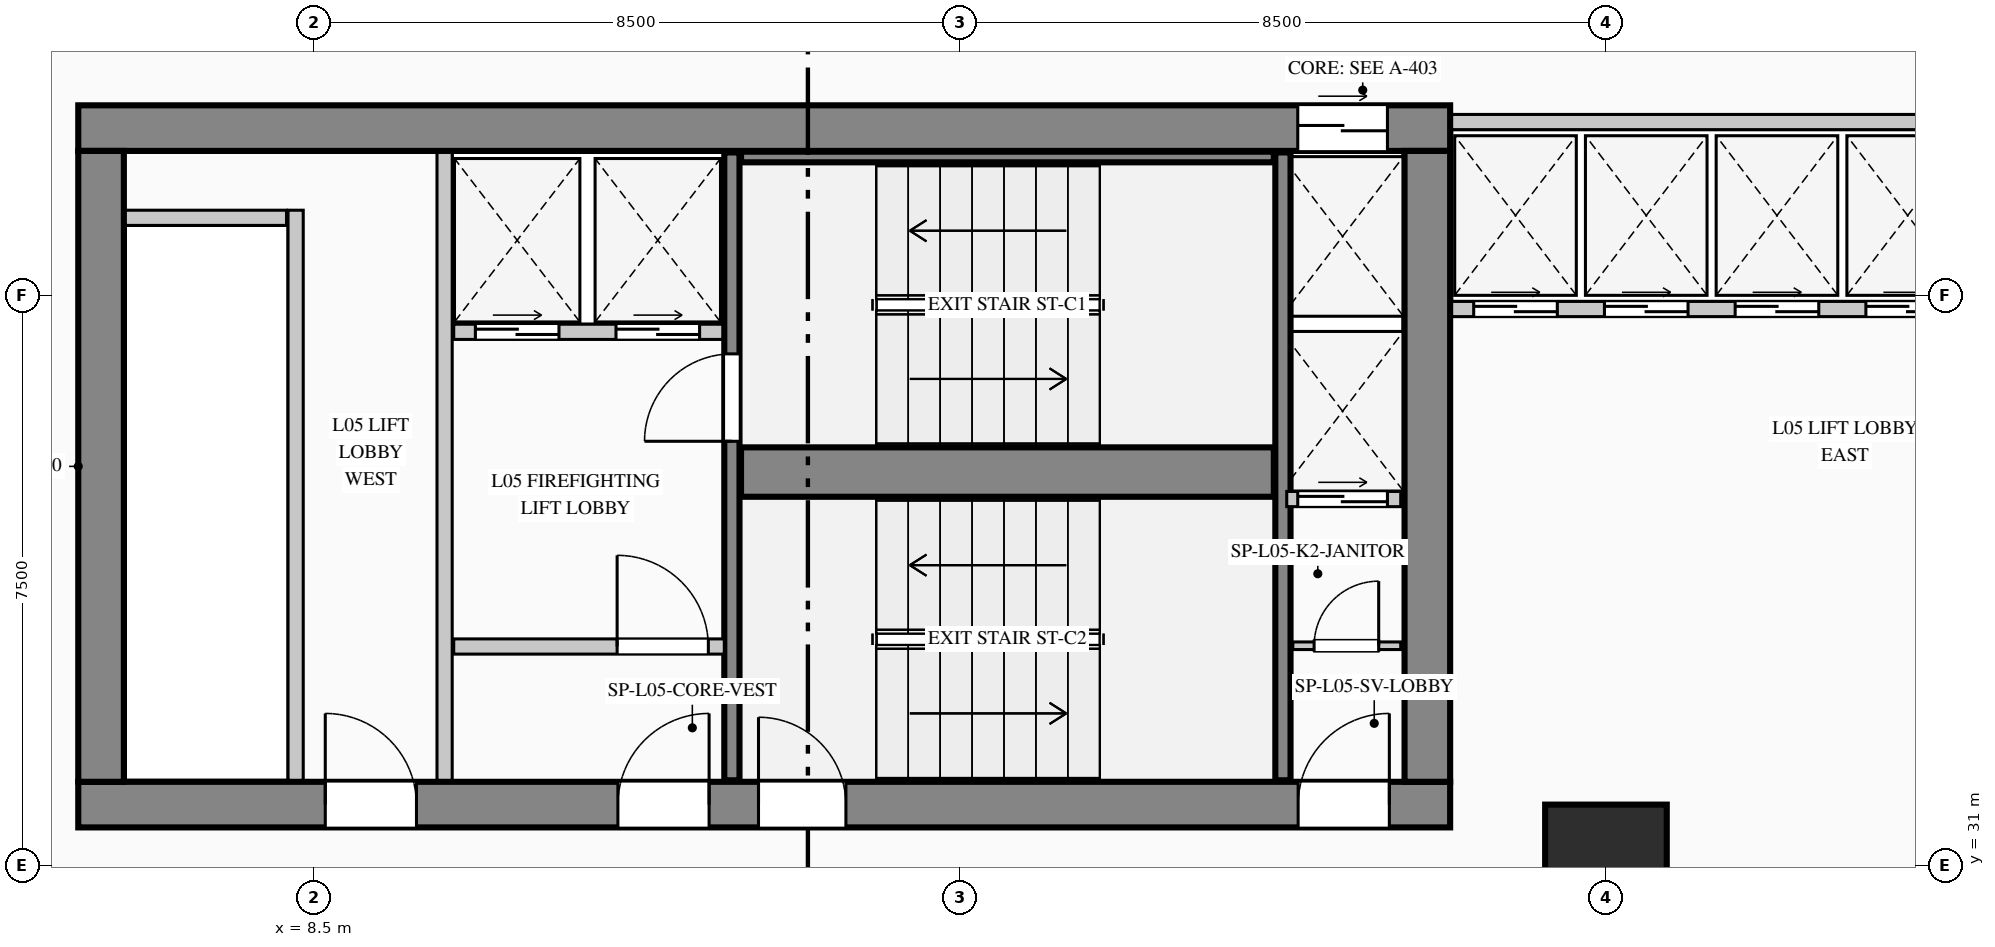
"""IFC4 building model, lengths in metres.
Left out: names, types, materials, properties, quantities, classifications, styles, units other than length and angle.
Written with IfcOpenShell. Run it as: python <this file> out.ifc"""

import sys

from ifc_helpers import new_model, si_unit, direction, frame, frame_2d, origin, origin_2d, place, context, subcontext, project, spatial, rectangle, extrude, element, fill, save


model = new_model("IFC4")
c1 = context("Model", 3, precision=1e-05, world=origin(), true_north=direction((0.0, 1.0)))
c2 = subcontext(c1, "Body", "Model", "MODEL_VIEW")
j1 = project(units=[si_unit("LENGTHUNIT", "METRE"), si_unit("PLANEANGLEUNIT", "RADIAN")], contexts=[c1])
p1 = place(None, origin())
s1 = spatial("IfcSite", under=j1, at=p1, CompositionType="ELEMENT")
p2 = place(p1, origin())
s2 = spatial("IfcBuilding", under=s1, at=p2, CompositionType="ELEMENT")
p3 = place(p2, frame((0.0, 0.0, 21.6)))
s3 = spatial("IfcBuildingStorey", under=s2, at=p3, CompositionType="ELEMENT", Elevation=21.6)
p4 = place(p3, frame((5.4, 40.7, 0.0), z_axis=(0.0, 0.0, 1.0), x_axis=(1.0, 0.0, 0.0)))
e1 = element("IfcWall", 1, at=p4, inside=s3, PredefinedType="SHEAR", context=c2, shape_type="SweptSolid", body=[
    extrude(rectangle(XDim=18.05, YDim=0.6, at=frame_2d((9.025, 0.0))), origin(), (0.0, 0.0, 1.0), 5.4),
])
p5 = place(p4, frame((16.045, 0.0, 0.0)))
e2 = element("IfcOpeningElement", 2, at=p5, cuts=e1, PredefinedType="OPENING", context=c2, shape_type="SweptSolid", body=[
    extrude(rectangle(XDim=1.18, YDim=2.25, at=frame_2d((0.59, 1.125))), frame((0.0, 0.31, 0.0), z_axis=(0.0, -1.0, 0.0), x_axis=(1.0, 0.0, 0.0)), (0.0, 0.0, 1.0), 0.62),
])
p6 = place(p3, frame((5.4, 31.8, 0.0), z_axis=(0.0, 0.0, 1.0), x_axis=(1.0, 0.0, 0.0)))
e3 = element("IfcWall", 3, at=p6, inside=s3, PredefinedType="SHEAR", context=c2, shape_type="SweptSolid", body=[
    extrude(rectangle(XDim=18.05, YDim=0.6, at=frame_2d((9.025, 0.0))), origin(), (0.0, 0.0, 1.0), 5.4),
])
p7 = place(p6, frame((3.25, 0.0, 0.0)))
e4 = element("IfcOpeningElement", 4, at=p7, cuts=e3, PredefinedType="OPENING", context=c2, shape_type="SweptSolid", body=[
    extrude(rectangle(XDim=1.2, YDim=2.2, at=frame_2d((0.6, 1.1))), frame((0.0, 0.31, 0.0), z_axis=(0.0, -1.0, 0.0), x_axis=(1.0, 0.0, 0.0)), (0.0, 0.0, 1.0), 0.62),
])
p8 = place(p6, frame((7.1, 0.0, 0.0)))
e5 = element("IfcOpeningElement", 5, at=p8, cuts=e3, PredefinedType="OPENING", context=c2, shape_type="SweptSolid", body=[
    extrude(rectangle(XDim=1.2, YDim=2.2, at=frame_2d((0.6, 1.1))), frame((0.0, 0.31, 0.0), z_axis=(0.0, -1.0, 0.0), x_axis=(1.0, 0.0, 0.0)), (0.0, 0.0, 1.0), 0.62),
])
p9 = place(p6, frame((8.95, 0.0, 0.0)))
e6 = element("IfcOpeningElement", 6, at=p9, cuts=e3, PredefinedType="OPENING", context=c2, shape_type="SweptSolid", body=[
    extrude(rectangle(XDim=1.15, YDim=2.2, at=frame_2d((0.575, 1.1))), frame((0.0, 0.31, 0.0), z_axis=(0.0, -1.0, 0.0), x_axis=(1.0, 0.0, 0.0)), (0.0, 0.0, 1.0), 0.62),
])
p10 = place(p6, frame((16.05, 0.0, 0.0)))
e7 = element("IfcOpeningElement", 7, at=p10, cuts=e3, PredefinedType="OPENING", context=c2, shape_type="SweptSolid", body=[
    extrude(rectangle(XDim=1.2, YDim=2.2, at=frame_2d((0.6, 1.1))), frame((0.0, 0.31, 0.0), z_axis=(0.0, -1.0, 0.0), x_axis=(1.0, 0.0, 0.0)), (0.0, 0.0, 1.0), 0.62),
])
for number, where, z_axis, x_axis in (
    (8, (5.7, 32.1, 0.0), (0.0, 0.0, 1.0), (0.0, 1.0, 0.0)),
    (9, (23.15, 32.1, 0.0), (0.0, 0.0, 1.0), (0.0, 1.0, 0.0)),
):
    element("IfcWall", number, at=place(p3, frame(where, z_axis=z_axis, x_axis=x_axis)), inside=s3, PredefinedType="SHEAR", context=c2, shape_type="SweptSolid", body=[
        extrude(rectangle(XDim=8.3, YDim=0.6, at=frame_2d((4.15, 0.0))), origin(), (0.0, 0.0, 1.0), 5.4),
    ])
p11 = place(p3, frame((14.0, 32.12, 0.0), z_axis=(0.0, 0.0, 1.0), x_axis=(0.0, 1.0, 0.0)))
e10 = element("IfcWall", 10, at=p11, inside=s3, PredefinedType="SHEAR", context=c2, shape_type="SweptSolid", body=[
    extrude(rectangle(XDim=8.26, YDim=0.2, at=frame_2d((4.13, 0.0))), origin(), (0.0, 0.0, 1.0), 5.4),
])
p12 = place(p11, frame((4.46, 0.0, 0.0)))
e11 = element("IfcOpeningElement", 11, at=p12, cuts=e10, PredefinedType="OPENING", context=c2, shape_type="SweptSolid", body=[
    extrude(rectangle(XDim=1.15, YDim=2.2, at=frame_2d((0.575, 1.1))), frame((0.0, 0.11, 0.0), z_axis=(0.0, -1.0, 0.0), x_axis=(1.0, 0.0, 0.0)), (0.0, 0.0, 1.0), 0.22),
])
p13 = place(p3, frame((14.12, 36.175, 0.0), z_axis=(0.0, 0.0, 1.0), x_axis=(1.0, 0.0, 0.0)))
e12 = element("IfcWall", 12, at=p13, inside=s3, PredefinedType="SHEAR", context=c2, shape_type="SweptSolid", body=[
    extrude(rectangle(XDim=7.01, YDim=0.65, at=frame_2d((3.505, 0.0))), origin(), (0.0, 0.0, 1.0), 5.4),
])
p14 = place(p3, frame((21.25, 32.12, 0.0), z_axis=(0.0, 0.0, 1.0), x_axis=(0.0, 1.0, 0.0)))
e13 = element("IfcWall", 13, at=p14, inside=s3, PredefinedType="SHEAR", context=c2, shape_type="SweptSolid", body=[
    extrude(rectangle(XDim=8.26, YDim=0.2, at=frame_2d((4.13, 0.0))), origin(), (0.0, 0.0, 1.0), 5.4),
])
p15 = place(p3, frame((14.12, 40.32, 0.0), z_axis=(0.0, 0.0, 1.0), x_axis=(1.0, 0.0, 0.0)))
e14 = element("IfcWall", 14, at=p15, inside=s3, PredefinedType="SHEAR", context=c2, shape_type="SweptSolid", body=[
    extrude(rectangle(XDim=7.01, YDim=0.14, at=frame_2d((3.505, 0.0))), origin(), (0.0, 0.0, 1.0), 5.4),
])
p16 = place(p3, frame((25.5, 31.0, 0.0), z_axis=(0.0, 0.0, 1.0), x_axis=(1.0, 0.0, 0.0)))
e15 = element("IfcColumn", 15, at=p16, inside=s3, PredefinedType="COLUMN", context=c2, shape_type="SweptSolid", body=[
    extrude(rectangle(XDim=1.6, YDim=1.6, at=origin_2d()), origin(), (0.0, 0.0, 1.0), 5.4),
])
p17 = place(p3, frame((8.531, 4.85, 0.0), z_axis=(0.0, 0.0, 1.0), x_axis=(-0.150391137476, 0.988626575492, 0.0)))
e16 = element("IfcWall", 16, at=p17, inside=s3, PredefinedType="STANDARD", context=c2, shape_type="SweptSolid", body=[
    extrude(rectangle(XDim=36.718, YDim=0.3, at=frame_2d((18.359, 0.0))), origin(), (0.0, 0.0, 1.0), 5.0),
])
p18 = place(p3, frame((8.26, 32.12, 0.0), z_axis=(0.0, 0.0, 1.0), x_axis=(0.0, 1.0, 0.0)))
e17 = element("IfcWall", 17, at=p18, inside=s3, PredefinedType="PARTITIONING", context=c2, shape_type="SweptSolid", body=[
    extrude(rectangle(XDim=7.5, YDim=0.2, at=frame_2d((3.75, 0.0))), origin(), (0.0, 0.0, 1.0), 5.0),
])
p19 = place(p3, frame((6.02, 39.52, 0.0), z_axis=(0.0, 0.0, 1.0), x_axis=(1.0, 0.0, 0.0)))
e18 = element("IfcWall", 18, at=p19, inside=s3, PredefinedType="PARTITIONING", context=c2, shape_type="SweptSolid", body=[
    extrude(rectangle(XDim=2.12, YDim=0.2, at=frame_2d((1.06, 0.0))), origin(), (0.0, 0.0, 1.0), 5.0),
])
p20 = place(p3, frame((10.22, 32.12, 0.0), z_axis=(0.0, 0.0, 1.0), x_axis=(0.0, 1.0, 0.0)))
e19 = element("IfcWall", 19, at=p20, inside=s3, PredefinedType="PARTITIONING", context=c2, shape_type="SweptSolid", body=[
    extrude(rectangle(XDim=8.26, YDim=0.2, at=frame_2d((4.13, 0.0))), origin(), (0.0, 0.0, 1.0), 5.0),
])
p21 = place(p3, frame((10.34, 38.02, 0.0), z_axis=(0.0, 0.0, 1.0), x_axis=(1.0, 0.0, 0.0)))
e20 = element("IfcWall", 20, at=p21, inside=s3, PredefinedType="PARTITIONING", context=c2, shape_type="SweptSolid", body=[
    extrude(rectangle(XDim=3.54, YDim=0.2, at=frame_2d((1.77, 0.0))), origin(), (0.0, 0.0, 1.0), 5.0),
])
p22 = place(p21, frame((0.285, 0.0, 0.0)))
e21 = element("IfcOpeningElement", 21, at=p22, cuts=e20, PredefinedType="OPENING", context=c2, shape_type="SweptSolid", body=[
    extrude(rectangle(XDim=1.1, YDim=2.2, at=frame_2d((0.55, 1.1))), frame((0.0, 0.11, 0.0), z_axis=(0.0, -1.0, 0.0), x_axis=(1.0, 0.0, 0.0)), (0.0, 0.0, 1.0), 0.22),
])
p23 = place(p21, frame((2.135, 0.0, 0.0)))
e22 = element("IfcOpeningElement", 22, at=p23, cuts=e20, PredefinedType="OPENING", context=c2, shape_type="SweptSolid", body=[
    extrude(rectangle(XDim=1.1, YDim=2.2, at=frame_2d((0.55, 1.1))), frame((0.0, 0.11, 0.0), z_axis=(0.0, -1.0, 0.0), x_axis=(1.0, 0.0, 0.0)), (0.0, 0.0, 1.0), 0.22),
])
p24 = place(p3, frame((10.34, 33.88, 0.0), z_axis=(0.0, 0.0, 1.0), x_axis=(1.0, 0.0, 0.0)))
e23 = element("IfcWall", 23, at=p24, inside=s3, PredefinedType="PARTITIONING", context=c2, shape_type="SweptSolid", body=[
    extrude(rectangle(XDim=3.56, YDim=0.2, at=frame_2d((1.78, 0.0))), origin(), (0.0, 0.0, 1.0), 5.0),
])
p25 = place(p24, frame((2.15, 0.0, 0.0)))
e24 = element("IfcOpeningElement", 24, at=p25, cuts=e23, PredefinedType="OPENING", context=c2, shape_type="SweptSolid", body=[
    extrude(rectangle(XDim=1.2, YDim=2.2, at=frame_2d((0.6, 1.1))), frame((0.0, 0.11, 0.0), z_axis=(0.0, -1.0, 0.0), x_axis=(1.0, 0.0, 0.0)), (0.0, 0.0, 1.0), 0.22),
])
p26 = place(p3, frame((21.38, 33.89, 0.0), z_axis=(0.0, 0.0, 1.0), x_axis=(1.0, 0.0, 0.0)))
e25 = element("IfcWall", 25, at=p26, inside=s3, PredefinedType="PARTITIONING", context=c2, shape_type="SweptSolid", body=[
    extrude(rectangle(XDim=1.42, YDim=0.1, at=frame_2d((0.71, 0.0))), origin(), (0.0, 0.0, 1.0), 5.0),
])
p27 = place(p26, frame((0.28, 0.0, 0.0)))
e26 = element("IfcOpeningElement", 26, at=p27, cuts=e25, PredefinedType="OPENING", context=c2, shape_type="SweptSolid", body=[
    extrude(rectangle(XDim=0.85, YDim=2.1, at=frame_2d((0.425, 1.05))), frame((0.0, 0.06, 0.0), z_axis=(0.0, -1.0, 0.0), x_axis=(1.0, 0.0, 0.0)), (0.0, 0.0, 1.0), 0.12),
])
p28 = place(p3, frame((21.3, 35.82, 0.0), z_axis=(0.0, 0.0, 1.0), x_axis=(1.0, 0.0, 0.0)))
e27 = element("IfcWall", 27, at=p28, inside=s3, PredefinedType="PARTITIONING", context=c2, shape_type="SweptSolid", body=[
    extrude(rectangle(XDim=1.5, YDim=0.2, at=frame_2d((0.75, 0.0))), origin(), (0.0, 0.0, 1.0), 5.0),
])
p29 = place(p28, frame((0.145, 0.0, 0.0)))
e28 = element("IfcOpeningElement", 28, at=p29, cuts=e27, PredefinedType="OPENING", context=c2, shape_type="SweptSolid", body=[
    extrude(rectangle(XDim=1.18, YDim=2.25, at=frame_2d((0.59, 1.125))), frame((0.0, 0.11, 0.0), z_axis=(0.0, -1.0, 0.0), x_axis=(1.0, 0.0, 0.0)), (0.0, 0.0, 1.0), 0.22),
])
p30 = place(p3, frame((23.47, 40.78, 0.0), z_axis=(0.0, 0.0, 1.0), x_axis=(1.0, 0.0, 0.0)))
e29 = element("IfcWall", 29, at=p30, inside=s3, PredefinedType="PARTITIONING", context=c2, shape_type="SweptSolid", body=[
    extrude(rectangle(XDim=6.91, YDim=0.2, at=frame_2d((3.455, 0.0))), origin(), (0.0, 0.0, 1.0), 5.0),
])
p31 = place(p3, frame((23.47, 38.32, 0.0), z_axis=(0.0, 0.0, 1.0), x_axis=(1.0, 0.0, 0.0)))
e30 = element("IfcWall", 30, at=p31, inside=s3, PredefinedType="PARTITIONING", context=c2, shape_type="SweptSolid", body=[
    extrude(rectangle(XDim=6.79, YDim=0.2, at=frame_2d((3.395, 0.0))), origin(), (0.0, 0.0, 1.0), 5.0),
])
p32 = place(p31, frame((0.29, 0.0, 0.0)))
e31 = element("IfcOpeningElement", 31, at=p32, cuts=e30, PredefinedType="OPENING", context=c2, shape_type="SweptSolid", body=[
    extrude(rectangle(XDim=1.1, YDim=2.2, at=frame_2d((0.55, 1.1))), frame((0.0, 0.11, 0.0), z_axis=(0.0, -1.0, 0.0), x_axis=(1.0, 0.0, 0.0)), (0.0, 0.0, 1.0), 0.22),
])
p33 = place(p31, frame((2.01, 0.0, 0.0)))
e32 = element("IfcOpeningElement", 32, at=p33, cuts=e30, PredefinedType="OPENING", context=c2, shape_type="SweptSolid", body=[
    extrude(rectangle(XDim=1.1, YDim=2.2, at=frame_2d((0.55, 1.1))), frame((0.0, 0.11, 0.0), z_axis=(0.0, -1.0, 0.0), x_axis=(1.0, 0.0, 0.0)), (0.0, 0.0, 1.0), 0.22),
])
p34 = place(p31, frame((3.73, 0.0, 0.0)))
e33 = element("IfcOpeningElement", 33, at=p34, cuts=e30, PredefinedType="OPENING", context=c2, shape_type="SweptSolid", body=[
    extrude(rectangle(XDim=1.1, YDim=2.2, at=frame_2d((0.55, 1.1))), frame((0.0, 0.11, 0.0), z_axis=(0.0, -1.0, 0.0), x_axis=(1.0, 0.0, 0.0)), (0.0, 0.0, 1.0), 0.22),
])
p35 = place(p31, frame((5.45, 0.0, 0.0)))
e34 = element("IfcOpeningElement", 34, at=p35, cuts=e30, PredefinedType="OPENING", context=c2, shape_type="SweptSolid", body=[
    extrude(rectangle(XDim=1.1, YDim=2.2, at=frame_2d((0.55, 1.1))), frame((0.0, 0.11, 0.0), z_axis=(0.0, -1.0, 0.0), x_axis=(1.0, 0.0, 0.0)), (0.0, 0.0, 1.0), 0.22),
])
p36 = place(p7, origin())
e35 = element("IfcDoor", 35, at=p36, inside=s3, OperationType="SINGLE_SWING_LEFT", PredefinedType="DOOR", context=c2, shape_type="SweptSolid", body=[
    extrude(rectangle(XDim=1.2, YDim=2.2, at=frame_2d((0.6, 1.1))), frame((0.0, 0.025, 0.0), z_axis=(0.0, -1.0, 0.0), x_axis=(1.0, 0.0, 0.0)), (0.0, 0.0, 1.0), 0.05),
])
fill(e4, e35)
p37 = place(p8, origin())
e36 = element("IfcDoor", 36, at=p37, inside=s3, OperationType="SINGLE_SWING_RIGHT", PredefinedType="DOOR", context=c2, shape_type="SweptSolid", body=[
    extrude(rectangle(XDim=1.2, YDim=2.2, at=frame_2d((0.6, 1.1))), frame((0.0, 0.025, 0.0), z_axis=(0.0, -1.0, 0.0), x_axis=(1.0, 0.0, 0.0)), (0.0, 0.0, 1.0), 0.05),
])
fill(e5, e36)
p38 = place(p9, origin())
e37 = element("IfcDoor", 37, at=p38, inside=s3, OperationType="SINGLE_SWING_LEFT", PredefinedType="DOOR", context=c2, shape_type="SweptSolid", body=[
    extrude(rectangle(XDim=1.15, YDim=2.2, at=frame_2d((0.575, 1.1))), frame((0.0, 0.025, 0.0), z_axis=(0.0, -1.0, 0.0), x_axis=(1.0, 0.0, 0.0)), (0.0, 0.0, 1.0), 0.05),
])
fill(e6, e37)
p39 = place(p10, origin())
e38 = element("IfcDoor", 38, at=p39, inside=s3, OperationType="SINGLE_SWING_RIGHT", PredefinedType="DOOR", context=c2, shape_type="SweptSolid", body=[
    extrude(rectangle(XDim=1.2, YDim=2.2, at=frame_2d((0.6, 1.1))), frame((0.0, 0.025, 0.0), z_axis=(0.0, -1.0, 0.0), x_axis=(1.0, 0.0, 0.0)), (0.0, 0.0, 1.0), 0.05),
])
fill(e7, e38)
p40 = place(p25, origin())
e39 = element("IfcDoor", 39, at=p40, inside=s3, OperationType="SINGLE_SWING_LEFT", PredefinedType="DOOR", context=c2, shape_type="SweptSolid", body=[
    extrude(rectangle(XDim=1.2, YDim=2.2, at=frame_2d((0.6, 1.1))), frame((0.0, 0.025, 0.0), z_axis=(0.0, -1.0, 0.0), x_axis=(1.0, 0.0, 0.0)), (0.0, 0.0, 1.0), 0.05),
])
fill(e24, e39)
p41 = place(p27, origin())
e40 = element("IfcDoor", 40, at=p41, inside=s3, OperationType="SINGLE_SWING_RIGHT", PredefinedType="DOOR", context=c2, shape_type="SweptSolid", body=[
    extrude(rectangle(XDim=0.85, YDim=2.1, at=frame_2d((0.425, 1.05))), frame((0.0, 0.025, 0.0), z_axis=(0.0, -1.0, 0.0), x_axis=(1.0, 0.0, 0.0)), (0.0, 0.0, 1.0), 0.05),
])
fill(e26, e40)
p42 = place(p12, origin())
e41 = element("IfcDoor", 41, at=p42, inside=s3, OperationType="SINGLE_SWING_LEFT", PredefinedType="DOOR", context=c2, shape_type="SweptSolid", body=[
    extrude(rectangle(XDim=1.15, YDim=2.2, at=frame_2d((0.575, 1.1))), frame((0.0, 0.025, 0.0), z_axis=(0.0, -1.0, 0.0), x_axis=(1.0, 0.0, 0.0)), (0.0, 0.0, 1.0), 0.05),
])
fill(e11, e41)
p43 = place(p22, origin())
e42 = element("IfcDoor", 42, at=p43, inside=s3, OperationType="DOUBLE_DOOR_SLIDING", PredefinedType="DOOR", context=c2, shape_type="SweptSolid", body=[
    extrude(rectangle(XDim=1.1, YDim=2.2, at=frame_2d((0.55, 1.1))), frame((0.0, 0.025, 0.0), z_axis=(0.0, -1.0, 0.0), x_axis=(1.0, 0.0, 0.0)), (0.0, 0.0, 1.0), 0.05),
])
fill(e21, e42)
p44 = place(p23, origin())
e43 = element("IfcDoor", 43, at=p44, inside=s3, OperationType="DOUBLE_DOOR_SLIDING", PredefinedType="DOOR", context=c2, shape_type="SweptSolid", body=[
    extrude(rectangle(XDim=1.1, YDim=2.2, at=frame_2d((0.55, 1.1))), frame((0.0, 0.025, 0.0), z_axis=(0.0, -1.0, 0.0), x_axis=(1.0, 0.0, 0.0)), (0.0, 0.0, 1.0), 0.05),
])
fill(e22, e43)
p45 = place(p5, origin())
e44 = element("IfcDoor", 44, at=p45, inside=s3, OperationType="DOUBLE_DOOR_SLIDING", PredefinedType="DOOR", context=c2, shape_type="SweptSolid", body=[
    extrude(rectangle(XDim=1.18, YDim=2.25, at=frame_2d((0.59, 1.125))), frame((0.0, 0.025, 0.0), z_axis=(0.0, -1.0, 0.0), x_axis=(1.0, 0.0, 0.0)), (0.0, 0.0, 1.0), 0.05),
])
fill(e2, e44)
p46 = place(p29, origin())
e45 = element("IfcDoor", 45, at=p46, inside=s3, OperationType="DOUBLE_DOOR_SLIDING", PredefinedType="DOOR", context=c2, shape_type="SweptSolid", body=[
    extrude(rectangle(XDim=1.18, YDim=2.25, at=frame_2d((0.59, 1.125))), frame((0.0, 0.025, 0.0), z_axis=(0.0, -1.0, 0.0), x_axis=(1.0, 0.0, 0.0)), (0.0, 0.0, 1.0), 0.05),
])
fill(e28, e45)
p47 = place(p32, origin())
e46 = element("IfcDoor", 46, at=p47, inside=s3, OperationType="DOUBLE_DOOR_SLIDING", PredefinedType="DOOR", context=c2, shape_type="SweptSolid", body=[
    extrude(rectangle(XDim=1.1, YDim=2.2, at=frame_2d((0.55, 1.1))), frame((0.0, 0.025, 0.0), z_axis=(0.0, -1.0, 0.0), x_axis=(1.0, 0.0, 0.0)), (0.0, 0.0, 1.0), 0.05),
])
fill(e31, e46)
p48 = place(p33, origin())
e47 = element("IfcDoor", 47, at=p48, inside=s3, OperationType="DOUBLE_DOOR_SLIDING", PredefinedType="DOOR", context=c2, shape_type="SweptSolid", body=[
    extrude(rectangle(XDim=1.1, YDim=2.2, at=frame_2d((0.55, 1.1))), frame((0.0, 0.025, 0.0), z_axis=(0.0, -1.0, 0.0), x_axis=(1.0, 0.0, 0.0)), (0.0, 0.0, 1.0), 0.05),
])
fill(e32, e47)
p49 = place(p34, origin())
e48 = element("IfcDoor", 48, at=p49, inside=s3, OperationType="DOUBLE_DOOR_SLIDING", PredefinedType="DOOR", context=c2, shape_type="SweptSolid", body=[
    extrude(rectangle(XDim=1.1, YDim=2.2, at=frame_2d((0.55, 1.1))), frame((0.0, 0.025, 0.0), z_axis=(0.0, -1.0, 0.0), x_axis=(1.0, 0.0, 0.0)), (0.0, 0.0, 1.0), 0.05),
])
fill(e33, e48)
p50 = place(p35, origin())
e49 = element("IfcDoor", 49, at=p50, inside=s3, OperationType="DOUBLE_DOOR_SLIDING", PredefinedType="DOOR", context=c2, shape_type="SweptSolid", body=[
    extrude(rectangle(XDim=1.1, YDim=2.2, at=frame_2d((0.55, 1.1))), frame((0.0, 0.025, 0.0), z_axis=(0.0, -1.0, 0.0), x_axis=(1.0, 0.0, 0.0)), (0.0, 0.0, 1.0), 0.05),
])
fill(e34, e49)
save(model, sys.argv[1])
